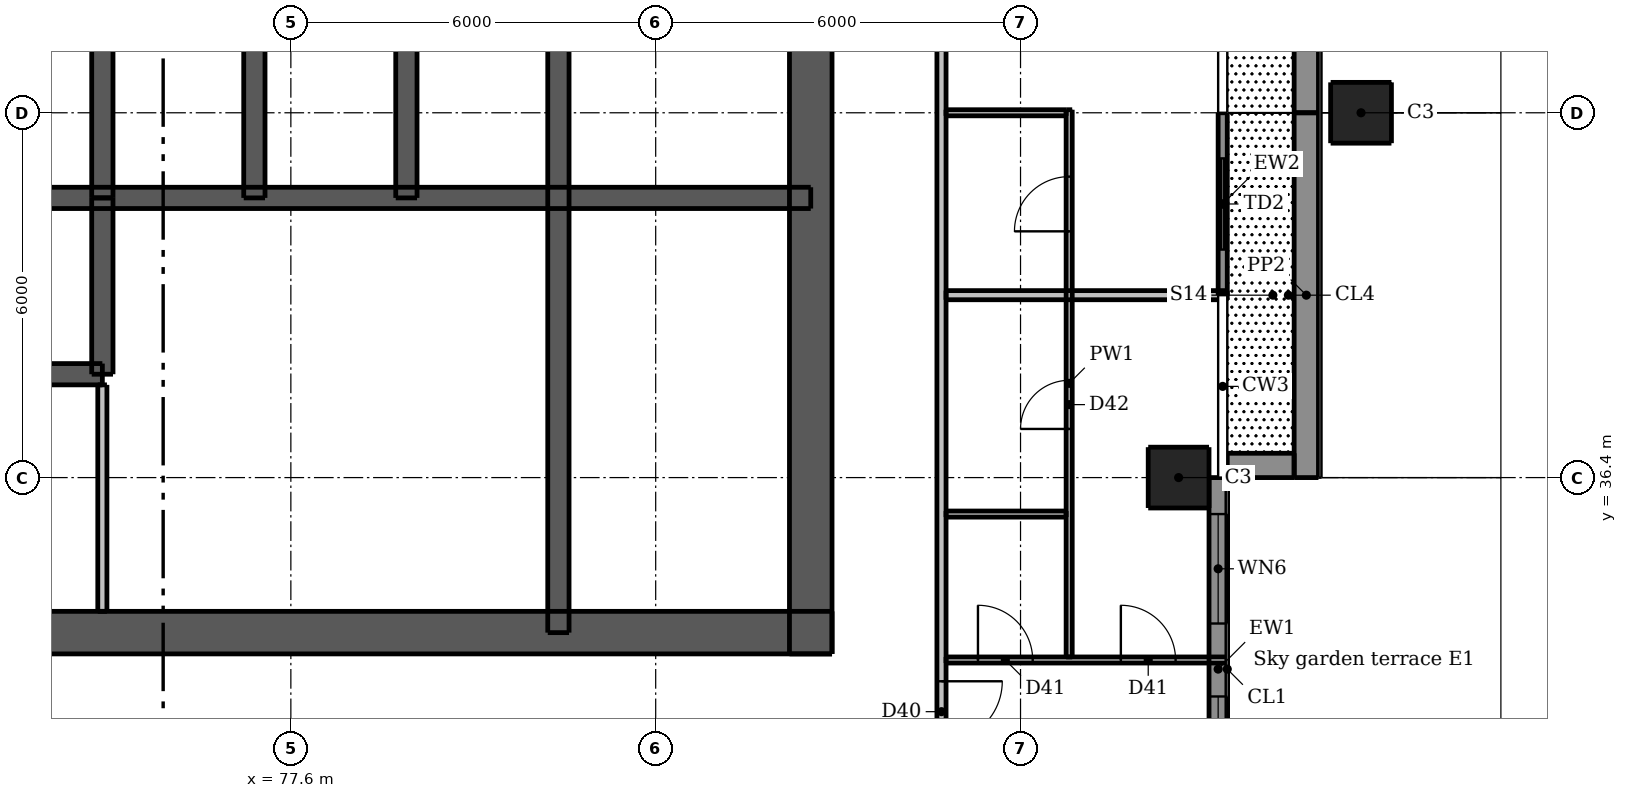
"""IFC4 building model, lengths in metres.
Left out: names, types, materials, properties, quantities, classifications, styles, units other than length and angle.
Written with IfcOpenShell. Run it as: python <this file> out.ifc"""

import sys

from ifc_helpers import new_model, si_unit, direction, frame, frame_2d, origin, origin_2d, place, context, subcontext, project, spatial, rectangle, extrude, element, fill, save


model = new_model("IFC4")
c1 = context("Model", 3, precision=1e-05, world=origin(), true_north=direction((0.0, 1.0)))
c2 = subcontext(c1, "Body", "Model", "MODEL_VIEW")
j1 = project(units=[si_unit("LENGTHUNIT", "METRE"), si_unit("PLANEANGLEUNIT", "RADIAN")], contexts=[c1])
p1 = place(None, origin())
s1 = spatial("IfcSite", under=j1, at=p1, CompositionType="ELEMENT")
p2 = place(p1, origin())
s2 = spatial("IfcBuilding", under=s1, at=p2, CompositionType="ELEMENT")
p3 = place(p2, frame((0.0, 0.0, 164.8)))
s3 = spatial("IfcBuildingStorey", under=s2, at=p3, CompositionType="ELEMENT", Elevation=164.8)
p4 = place(p3, frame((62.5, 33.85, 0.0), z_axis=(0.0, 0.0, 1.0), x_axis=(1.0, 0.0, 0.0)))
e1 = element("IfcWall", 1, at=p4, inside=s3, PredefinedType="SHEAR", context=c2, shape_type="SweptSolid", body=[
    extrude(rectangle(XDim=24.0, YDim=0.7, at=frame_2d((12.0, 0.0))), origin(), (0.0, 0.0, 1.0), 3.05),
])
p5 = place(p4, frame((1.962, 0.0, 0.0)))
e2 = element("IfcOpeningElement", 2, at=p5, cuts=e1, PredefinedType="OPENING", context=c2, shape_type="SweptSolid", body=[
    extrude(rectangle(XDim=1.1, YDim=2.1, at=frame_2d((0.55, 1.05))), frame((0.0, 0.36, 0.0), z_axis=(0.0, -1.0, 0.0), x_axis=(1.0, 0.0, 0.0)), (0.0, 0.0, 1.0), 0.72),
])
p6 = place(p4, frame((20.938, 0.0, 0.0)))
e3 = element("IfcOpeningElement", 3, at=p6, cuts=e1, PredefinedType="OPENING", context=c2, shape_type="SweptSolid", body=[
    extrude(rectangle(XDim=1.1, YDim=2.1, at=frame_2d((0.55, 1.05))), frame((0.0, 0.36, 0.0), z_axis=(0.0, -1.0, 0.0), x_axis=(1.0, 0.0, 0.0)), (0.0, 0.0, 1.0), 0.72),
])
p7 = place(p4, frame((8.0, 0.0, 0.0)))
e4 = element("IfcOpeningElement", 4, at=p7, cuts=e1, PredefinedType="OPENING", context=c2, shape_type="SweptSolid", body=[
    extrude(rectangle(XDim=1.1, YDim=2.1, at=frame_2d((0.55, 1.05))), frame((0.0, 0.36, 0.0), z_axis=(0.0, -1.0, 0.0), x_axis=(1.0, 0.0, 0.0)), (0.0, 0.0, 1.0), 0.72),
])
p8 = place(p4, frame((15.3, 0.0, 0.0)))
e5 = element("IfcOpeningElement", 5, at=p8, cuts=e1, PredefinedType="OPENING", context=c2, shape_type="SweptSolid", body=[
    extrude(rectangle(XDim=0.9, YDim=2.1, at=frame_2d((0.45, 1.05))), frame((0.0, 0.36, 0.0), z_axis=(0.0, -1.0, 0.0), x_axis=(1.0, 0.0, 0.0)), (0.0, 0.0, 1.0), 0.72),
])
p9 = place(p3, frame((86.15, 33.5, 0.0), z_axis=(0.0, 0.0, 1.0), x_axis=(0.0, 1.0, 0.0)))
e6 = element("IfcWall", 6, at=p9, inside=s3, PredefinedType="SHEAR", context=c2, shape_type="SweptSolid", body=[
    extrude(rectangle(XDim=24.0, YDim=0.7, at=frame_2d((12.0, 0.0))), origin(), (0.0, 0.0, 1.0), 3.05),
])
p10 = place(p9, frame((11.2, 0.0, 0.0)))
e7 = element("IfcOpeningElement", 7, at=p10, cuts=e6, PredefinedType="OPENING", context=c2, shape_type="SweptSolid", body=[
    extrude(rectangle(XDim=1.6, YDim=2.1, at=frame_2d((0.8, 1.05))), frame((0.0, 0.36, 0.0), z_axis=(0.0, -1.0, 0.0), x_axis=(1.0, 0.0, 0.0)), (0.0, 0.0, 1.0), 0.72),
])
p11 = place(p3, frame((62.85, 41.0, 0.0), z_axis=(0.0, 0.0, 1.0), x_axis=(1.0, 0.0, 0.0)))
e8 = element("IfcWall", 8, at=p11, inside=s3, PredefinedType="SHEAR", context=c2, shape_type="SweptSolid", body=[
    extrude(rectangle(XDim=23.3, YDim=0.35, at=frame_2d((11.65, 0.0))), origin(), (0.0, 0.0, 1.0), 3.05),
])
p12 = place(p3, frame((82.0, 33.85, 0.0), z_axis=(0.0, 0.0, 1.0), x_axis=(0.0, 1.0, 0.0)))
e9 = element("IfcWall", 9, at=p12, inside=s3, PredefinedType="SHEAR", context=c2, shape_type="SweptSolid", body=[
    extrude(rectangle(XDim=10.05, YDim=0.35, at=frame_2d((5.025, 0.0))), origin(), (0.0, 0.0, 1.0), 3.05),
])
for number, where, z_axis, x_axis in (
    (10, (74.5, 41.0, 0.0), (0.0, 0.0, 1.0), (0.0, 1.0, 0.0)),
    (11, (77.0, 41.0, 0.0), (0.0, 0.0, 1.0), (0.0, 1.0, 0.0)),
    (12, (79.5, 41.0, 0.0), (0.0, 0.0, 1.0), (0.0, 1.0, 0.0)),
):
    element("IfcWall", number, at=place(p3, frame(where, z_axis=z_axis, x_axis=x_axis)), inside=s3, PredefinedType="SHEAR", context=c2, shape_type="SweptSolid", body=[
        extrude(rectangle(XDim=2.9, YDim=0.35, at=frame_2d((1.45, 0.0))), origin(), (0.0, 0.0, 1.0), 3.05),
    ])
p13 = place(p3, frame((67.0, 38.1, 0.0), z_axis=(0.0, 0.0, 1.0), x_axis=(1.0, 0.0, 0.0)))
e13 = element("IfcWall", 13, at=p13, inside=s3, PredefinedType="SHEAR", context=c2, shape_type="SweptSolid", body=[
    extrude(rectangle(XDim=7.5, YDim=0.35, at=frame_2d((3.75, 0.0))), origin(), (0.0, 0.0, 1.0), 3.05),
])
p14 = place(p13, frame((0.7, 0.0, 0.0)))
e14 = element("IfcOpeningElement", 14, at=p14, cuts=e13, PredefinedType="OPENING", context=c2, shape_type="SweptSolid", body=[
    extrude(rectangle(XDim=1.1, YDim=2.1, at=frame_2d((0.55, 1.05))), frame((0.0, 0.185, 0.0), z_axis=(0.0, -1.0, 0.0), x_axis=(1.0, 0.0, 0.0)), (0.0, 0.0, 1.0), 0.37),
])
p15 = place(p13, frame((3.2, 0.0, 0.0)))
e15 = element("IfcOpeningElement", 15, at=p15, cuts=e13, PredefinedType="OPENING", context=c2, shape_type="SweptSolid", body=[
    extrude(rectangle(XDim=1.1, YDim=2.1, at=frame_2d((0.55, 1.05))), frame((0.0, 0.185, 0.0), z_axis=(0.0, -1.0, 0.0), x_axis=(1.0, 0.0, 0.0)), (0.0, 0.0, 1.0), 0.37),
])
p16 = place(p13, frame((5.65, 0.0, 0.0)))
e16 = element("IfcOpeningElement", 16, at=p16, cuts=e13, PredefinedType="OPENING", context=c2, shape_type="SweptSolid", body=[
    extrude(rectangle(XDim=1.2, YDim=2.1, at=frame_2d((0.6, 1.05))), frame((0.0, 0.185, 0.0), z_axis=(0.0, -1.0, 0.0), x_axis=(1.0, 0.0, 0.0)), (0.0, 0.0, 1.0), 0.37),
])
p17 = place(p3, frame((74.5, 38.1, 0.0), z_axis=(0.0, 0.0, 1.0), x_axis=(0.0, 1.0, 0.0)))
e17 = element("IfcWall", 17, at=p17, inside=s3, PredefinedType="SHEAR", context=c2, shape_type="SweptSolid", body=[
    extrude(rectangle(XDim=2.9, YDim=0.35, at=frame_2d((1.45, 0.0))), origin(), (0.0, 0.0, 1.0), 3.05),
])
p18 = place(p3, frame((92.2, 36.4, 0.0), z_axis=(0.0, 0.0, 1.0), x_axis=(1.0, 0.0, 0.0)))
e18 = element("IfcColumn", 18, at=p18, inside=s3, PredefinedType="COLUMN", context=c2, shape_type="SweptSolid", body=[
    extrude(rectangle(XDim=1.0, YDim=1.0, at=origin_2d()), origin(), (0.0, 0.0, 1.0), 3.05),
])
p19 = place(p3, frame((95.2, 42.4, 0.0), z_axis=(0.0, 0.0, 1.0), x_axis=(1.0, 0.0, 0.0)))
e19 = element("IfcColumn", 19, at=p19, inside=s3, PredefinedType="COLUMN", context=c2, shape_type="SweptSolid", body=[
    extrude(rectangle(XDim=1.0, YDim=1.0, at=origin_2d()), origin(), (0.0, 0.0, 1.0), 3.3),
])
p20 = place(p3, frame((92.85, 30.1, 0.0), z_axis=(0.0, 0.0, 1.0), x_axis=(0.0, 1.0, 0.0)))
e20 = element("IfcWall", 20, at=p20, inside=s3, PredefinedType="SOLIDWALL", context=c2, shape_type="SweptSolid", body=[
    extrude(rectangle(XDim=6.3, YDim=0.3, at=frame_2d((3.15, 0.0))), origin(), (0.0, 0.0, 1.0), 3.05),
])
p21 = place(p20, frame((0.9, 0.0, 0.15)))
e21 = element("IfcOpeningElement", 21, at=p21, cuts=e20, PredefinedType="OPENING", context=c2, shape_type="SweptSolid", body=[
    extrude(rectangle(XDim=1.8, YDim=2.1, at=frame_2d((0.9, 1.05))), frame((0.0, 0.16, 0.0), z_axis=(0.0, -1.0, 0.0), x_axis=(1.0, 0.0, 0.0)), (0.0, 0.0, 1.0), 0.32),
])
p22 = place(p20, frame((3.9, 0.0, 0.15)))
e22 = element("IfcOpeningElement", 22, at=p22, cuts=e20, PredefinedType="OPENING", context=c2, shape_type="SweptSolid", body=[
    extrude(rectangle(XDim=1.8, YDim=2.1, at=frame_2d((0.9, 1.05))), frame((0.0, 0.16, 0.0), z_axis=(0.0, -1.0, 0.0), x_axis=(1.0, 0.0, 0.0)), (0.0, 0.0, 1.0), 0.32),
])
p23 = place(p3, frame((92.925, 39.4, 0.0), z_axis=(0.0, 0.0, 1.0), x_axis=(0.0, 1.0, 0.0)))
e23 = element("IfcWall", 23, at=p23, inside=s3, PredefinedType="SOLIDWALL", context=c2, shape_type="SweptSolid", body=[
    extrude(rectangle(XDim=3.0, YDim=0.15, at=frame_2d((1.5, 0.0))), origin(), (0.0, 0.0, 1.0), 3.05),
])
p24 = place(p23, frame((0.75, 0.0, 0.0)))
e24 = element("IfcOpeningElement", 24, at=p24, cuts=e23, PredefinedType="OPENING", context=c2, shape_type="SweptSolid", body=[
    extrude(rectangle(XDim=1.5, YDim=2.4, at=frame_2d((0.75, 1.2))), frame((0.0, 0.085, 0.0), z_axis=(0.0, -1.0, 0.0), x_axis=(1.0, 0.0, 0.0)), (0.0, 0.0, 1.0), 0.17),
])
p25 = place(p3, frame((94.3, 36.4, 0.03), z_axis=(0.0, 0.0, 1.0), x_axis=(0.0, 1.0, 0.0)))
e25 = element("IfcWall", 25, at=p25, inside=s3, PredefinedType="PARAPET", context=c2, shape_type="SweptSolid", body=[
    extrude(rectangle(XDim=6.0, YDim=0.4, at=frame_2d((3.0, 0.0))), origin(), (0.0, 0.0, 1.0), 1.1),
])
p26 = place(p3, frame((93.0, 36.6, 0.03), z_axis=(0.0, 0.0, 1.0), x_axis=(1.0, 0.0, 0.0)))
e26 = element("IfcWall", 26, at=p26, inside=s3, PredefinedType="PARAPET", context=c2, shape_type="SweptSolid", body=[
    extrude(rectangle(XDim=1.1, YDim=0.4, at=frame_2d((0.55, 0.0))), origin(), (0.0, 0.0, 1.0), 1.1),
])
p27 = place(p3, frame((94.3, 42.4, 0.03), z_axis=(0.0, 0.0, 1.0), x_axis=(0.0, 1.0, 0.0)))
e27 = element("IfcWall", 27, at=p27, inside=s3, PredefinedType="PARAPET", context=c2, shape_type="SweptSolid", body=[
    extrude(rectangle(XDim=6.0, YDim=0.4, at=frame_2d((3.0, 0.0))), origin(), (0.0, 0.0, 1.0), 1.1),
])
p28 = place(p3, frame((74.5, 34.2, 0.0), z_axis=(0.0, 0.0, 1.0), x_axis=(0.0, 1.0, 0.0)))
e28 = element("IfcWall", 28, at=p28, inside=s3, PredefinedType="PLUMBINGWALL", context=c2, shape_type="SweptSolid", body=[
    extrude(rectangle(XDim=3.725, YDim=0.15, at=frame_2d((1.863, 0.0))), origin(), (0.0, 0.0, 1.0), 3.05),
])
p29 = place(p3, frame((90.4, 33.45, 0.0), z_axis=(0.0, 0.0, 1.0), x_axis=(0.0, 1.0, 0.0)))
e29 = element("IfcWall", 29, at=p29, inside=s3, PredefinedType="PARTITIONING", context=c2, shape_type="SweptSolid", body=[
    extrude(rectangle(XDim=9.0, YDim=0.1, at=frame_2d((4.5, 0.0))), origin(), (0.0, 0.0, 1.0), 3.05),
])
p30 = place(p29, frame((3.75, 0.0, 0.0)))
e30 = element("IfcOpeningElement", 30, at=p30, cuts=e29, PredefinedType="OPENING", context=c2, shape_type="SweptSolid", body=[
    extrude(rectangle(XDim=0.8, YDim=2.1, at=frame_2d((0.4, 1.05))), frame((0.0, 0.06, 0.0), z_axis=(0.0, -1.0, 0.0), x_axis=(1.0, 0.0, 0.0)), (0.0, 0.0, 1.0), 0.12),
])
p31 = place(p29, frame((7.0, 0.0, 0.0)))
e31 = element("IfcOpeningElement", 31, at=p31, cuts=e29, PredefinedType="OPENING", context=c2, shape_type="SweptSolid", body=[
    extrude(rectangle(XDim=0.9, YDim=2.1, at=frame_2d((0.45, 1.05))), frame((0.0, 0.06, 0.0), z_axis=(0.0, -1.0, 0.0), x_axis=(1.0, 0.0, 0.0)), (0.0, 0.0, 1.0), 0.12),
])
p32 = place(p3, frame((88.375, 42.4, 0.0), z_axis=(0.0, 0.0, 1.0), x_axis=(1.0, 0.0, 0.0)))
e32 = element("IfcWall", 32, at=p32, inside=s3, PredefinedType="PARTITIONING", context=c2, shape_type="SweptSolid", body=[
    extrude(rectangle(XDim=1.975, YDim=0.1, at=frame_2d((0.988, 0.0))), origin(), (0.0, 0.0, 1.0), 2.59),
])
p33 = place(p3, frame((88.375, 35.8, 0.0), z_axis=(0.0, 0.0, 1.0), x_axis=(1.0, 0.0, 0.0)))
e33 = element("IfcWall", 33, at=p33, inside=s3, PredefinedType="PARTITIONING", context=c2, shape_type="SweptSolid", body=[
    extrude(rectangle(XDim=1.975, YDim=0.1, at=frame_2d((0.988, 0.0))), origin(), (0.0, 0.0, 1.0), 3.05),
])
p34 = place(p3, frame((88.375, 33.4, 0.0), z_axis=(0.0, 0.0, 1.0), x_axis=(1.0, 0.0, 0.0)))
e34 = element("IfcWall", 34, at=p34, inside=s3, PredefinedType="PARTITIONING", context=c2, shape_type="SweptSolid", body=[
    extrude(rectangle(XDim=4.625, YDim=0.1, at=frame_2d((2.312, 0.0))), origin(), (0.0, 0.0, 1.0), 3.05),
])
p35 = place(p34, frame((0.525, 0.0, 0.0)))
e35 = element("IfcOpeningElement", 35, at=p35, cuts=e34, PredefinedType="OPENING", context=c2, shape_type="SweptSolid", body=[
    extrude(rectangle(XDim=0.9, YDim=2.1, at=frame_2d((0.45, 1.05))), frame((0.0, 0.06, 0.0), z_axis=(0.0, -1.0, 0.0), x_axis=(1.0, 0.0, 0.0)), (0.0, 0.0, 1.0), 0.12),
])
p36 = place(p34, frame((2.875, 0.0, 0.0)))
e36 = element("IfcOpeningElement", 36, at=p36, cuts=e34, PredefinedType="OPENING", context=c2, shape_type="SweptSolid", body=[
    extrude(rectangle(XDim=0.9, YDim=2.1, at=frame_2d((0.45, 1.05))), frame((0.0, 0.06, 0.0), z_axis=(0.0, -1.0, 0.0), x_axis=(1.0, 0.0, 0.0)), (0.0, 0.0, 1.0), 0.12),
])
p37 = place(p3, frame((88.3, 61.175, 0.0), z_axis=(0.0, 0.0, 1.0), x_axis=(0.0, -1.0, 0.0)))
e37 = element("IfcWall", 37, at=p37, inside=s3, PredefinedType="PARTITIONING", context=c2, shape_type="SweptSolid", body=[
    extrude(rectangle(XDim=29.4, YDim=0.15, at=frame_2d((14.7, 0.0))), origin(), (0.0, 0.0, 1.0), 3.05),
])
p38 = place(p37, frame((28.125, 0.0, 0.0)))
e38 = element("IfcOpeningElement", 38, at=p38, cuts=e37, PredefinedType="OPENING", context=c2, shape_type="SweptSolid", body=[
    extrude(rectangle(XDim=1.0, YDim=2.1, at=frame_2d((0.5, 1.05))), frame((0.0, 0.085, 0.0), z_axis=(0.0, -1.0, 0.0), x_axis=(1.0, 0.0, 0.0)), (0.0, 0.0, 1.0), 0.17),
])
p39 = place(p37, frame((13.775, 0.0, 0.0)))
e39 = element("IfcOpeningElement", 39, at=p39, cuts=e37, PredefinedType="OPENING", context=c2, shape_type="SweptSolid", body=[
    extrude(rectangle(XDim=1.0, YDim=2.1, at=frame_2d((0.5, 1.05))), frame((0.0, 0.085, 0.0), z_axis=(0.0, -1.0, 0.0), x_axis=(1.0, 0.0, 0.0)), (0.0, 0.0, 1.0), 0.17),
])
p40 = place(p37, frame((3.275, 0.0, 0.0)))
e40 = element("IfcOpeningElement", 40, at=p40, cuts=e37, PredefinedType="OPENING", context=c2, shape_type="SweptSolid", body=[
    extrude(rectangle(XDim=1.0, YDim=2.1, at=frame_2d((0.5, 1.05))), frame((0.0, 0.085, 0.0), z_axis=(0.0, -1.0, 0.0), x_axis=(1.0, 0.0, 0.0)), (0.0, 0.0, 1.0), 0.17),
])
p41 = place(p3, frame((88.375, 39.4, 0.0), z_axis=(0.0, 0.0, 1.0), x_axis=(1.0, 0.0, 0.0)))
e41 = element("IfcWall", 41, at=p41, inside=s3, PredefinedType="PARTITIONING", context=c2, shape_type="SweptSolid", body=[
    extrude(rectangle(XDim=4.625, YDim=0.15, at=frame_2d((2.312, 0.0))), origin(), (0.0, 0.0, 1.0), 3.05),
])
p42 = place(p21, origin())
e42 = element("IfcWindow", 42, at=p42, inside=s3, PartitioningType="DOUBLE_PANEL_VERTICAL", PredefinedType="WINDOW", context=c2, shape_type="SweptSolid", body=[
    extrude(rectangle(XDim=1.8, YDim=2.1, at=frame_2d((0.9, 1.05))), frame((0.0, 0.03, 0.0), z_axis=(0.0, -1.0, 0.0), x_axis=(1.0, 0.0, 0.0)), (0.0, 0.0, 1.0), 0.06),
])
fill(e21, e42)
p43 = place(p22, origin())
e43 = element("IfcWindow", 43, at=p43, inside=s3, PartitioningType="DOUBLE_PANEL_VERTICAL", PredefinedType="WINDOW", context=c2, shape_type="SweptSolid", body=[
    extrude(rectangle(XDim=1.8, YDim=2.1, at=frame_2d((0.9, 1.05))), frame((0.0, 0.03, 0.0), z_axis=(0.0, -1.0, 0.0), x_axis=(1.0, 0.0, 0.0)), (0.0, 0.0, 1.0), 0.06),
])
fill(e22, e43)
p44 = place(p24, origin())
e44 = element("IfcDoor", 44, at=p44, inside=s3, OperationType="DOUBLE_DOOR_SLIDING", PredefinedType="DOOR", context=c2, shape_type="SweptSolid", body=[
    extrude(rectangle(XDim=1.5, YDim=2.4, at=frame_2d((0.75, 1.2))), frame((0.0, 0.025, 0.0), z_axis=(0.0, -1.0, 0.0), x_axis=(1.0, 0.0, 0.0)), (0.0, 0.0, 1.0), 0.05),
])
fill(e24, e44)
p45 = place(p6, origin())
e45 = element("IfcDoor", 45, at=p45, inside=s3, OperationType="SINGLE_SWING_RIGHT", PredefinedType="DOOR", context=c2, shape_type="SweptSolid", body=[
    extrude(rectangle(XDim=1.1, YDim=2.1, at=frame_2d((0.55, 1.05))), frame((0.0, 0.337, 0.0), z_axis=(0.0, -1.0, 0.0), x_axis=(1.0, 0.0, 0.0)), (0.0, 0.0, 1.0), 0.05),
])
fill(e3, e45)
p46 = place(p8, origin())
e46 = element("IfcDoor", 46, at=p46, inside=s3, OperationType="SINGLE_SWING_LEFT", PredefinedType="DOOR", context=c2, shape_type="SweptSolid", body=[
    extrude(rectangle(XDim=0.9, YDim=2.1, at=frame_2d((0.45, 1.05))), frame((0.0, 0.337, 0.0), z_axis=(0.0, -1.0, 0.0), x_axis=(1.0, 0.0, 0.0)), (0.0, 0.0, 1.0), 0.05),
])
fill(e5, e46)
p47 = place(p16, origin())
e47 = element("IfcDoor", 47, at=p47, inside=s3, OperationType="DOUBLE_DOOR_SLIDING", PredefinedType="DOOR", context=c2, shape_type="SweptSolid", body=[
    extrude(rectangle(XDim=1.2, YDim=2.1, at=frame_2d((0.6, 1.05))), frame((0.0, 0.025, 0.0), z_axis=(0.0, -1.0, 0.0), x_axis=(1.0, 0.0, 0.0)), (0.0, 0.0, 1.0), 0.05),
])
fill(e16, e47)
p48 = place(p38, origin())
e48 = element("IfcDoor", 48, at=p48, inside=s3, OperationType="SINGLE_SWING_LEFT", PredefinedType="DOOR", context=c2, shape_type="SweptSolid", body=[
    extrude(rectangle(XDim=1.0, YDim=2.1, at=frame_2d((0.5, 1.05))), frame((0.0, 0.025, 0.0), z_axis=(0.0, -1.0, 0.0), x_axis=(1.0, 0.0, 0.0)), (0.0, 0.0, 1.0), 0.05),
])
fill(e38, e48)
p49 = place(p35, origin())
e49 = element("IfcDoor", 49, at=p49, inside=s3, OperationType="SINGLE_SWING_LEFT", PredefinedType="DOOR", context=c2, shape_type="SweptSolid", body=[
    extrude(rectangle(XDim=0.9, YDim=2.1, at=frame_2d((0.45, 1.05))), frame((0.0, 0.025, 0.0), z_axis=(0.0, -1.0, 0.0), x_axis=(1.0, 0.0, 0.0)), (0.0, 0.0, 1.0), 0.05),
])
fill(e35, e49)
p50 = place(p36, origin())
e50 = element("IfcDoor", 50, at=p50, inside=s3, OperationType="SINGLE_SWING_LEFT", PredefinedType="DOOR", context=c2, shape_type="SweptSolid", body=[
    extrude(rectangle(XDim=0.9, YDim=2.1, at=frame_2d((0.45, 1.05))), frame((0.0, 0.025, 0.0), z_axis=(0.0, -1.0, 0.0), x_axis=(1.0, 0.0, 0.0)), (0.0, 0.0, 1.0), 0.05),
])
fill(e36, e50)
p51 = place(p30, origin())
e51 = element("IfcDoor", 51, at=p51, inside=s3, OperationType="SINGLE_SWING_LEFT", PredefinedType="DOOR", context=c2, shape_type="SweptSolid", body=[
    extrude(rectangle(XDim=0.8, YDim=2.1, at=frame_2d((0.4, 1.05))), frame((0.0, 0.025, 0.0), z_axis=(0.0, -1.0, 0.0), x_axis=(1.0, 0.0, 0.0)), (0.0, 0.0, 1.0), 0.05),
])
fill(e30, e51)
p52 = place(p31, origin())
e52 = element("IfcDoor", 52, at=p52, inside=s3, OperationType="SINGLE_SWING_LEFT", PredefinedType="DOOR", context=c2, shape_type="SweptSolid", body=[
    extrude(rectangle(XDim=0.9, YDim=2.1, at=frame_2d((0.45, 1.05))), frame((0.0, 0.025, 0.0), z_axis=(0.0, -1.0, 0.0), x_axis=(1.0, 0.0, 0.0)), (0.0, 0.0, 1.0), 0.05),
])
fill(e31, e52)
save(model, sys.argv[1])
